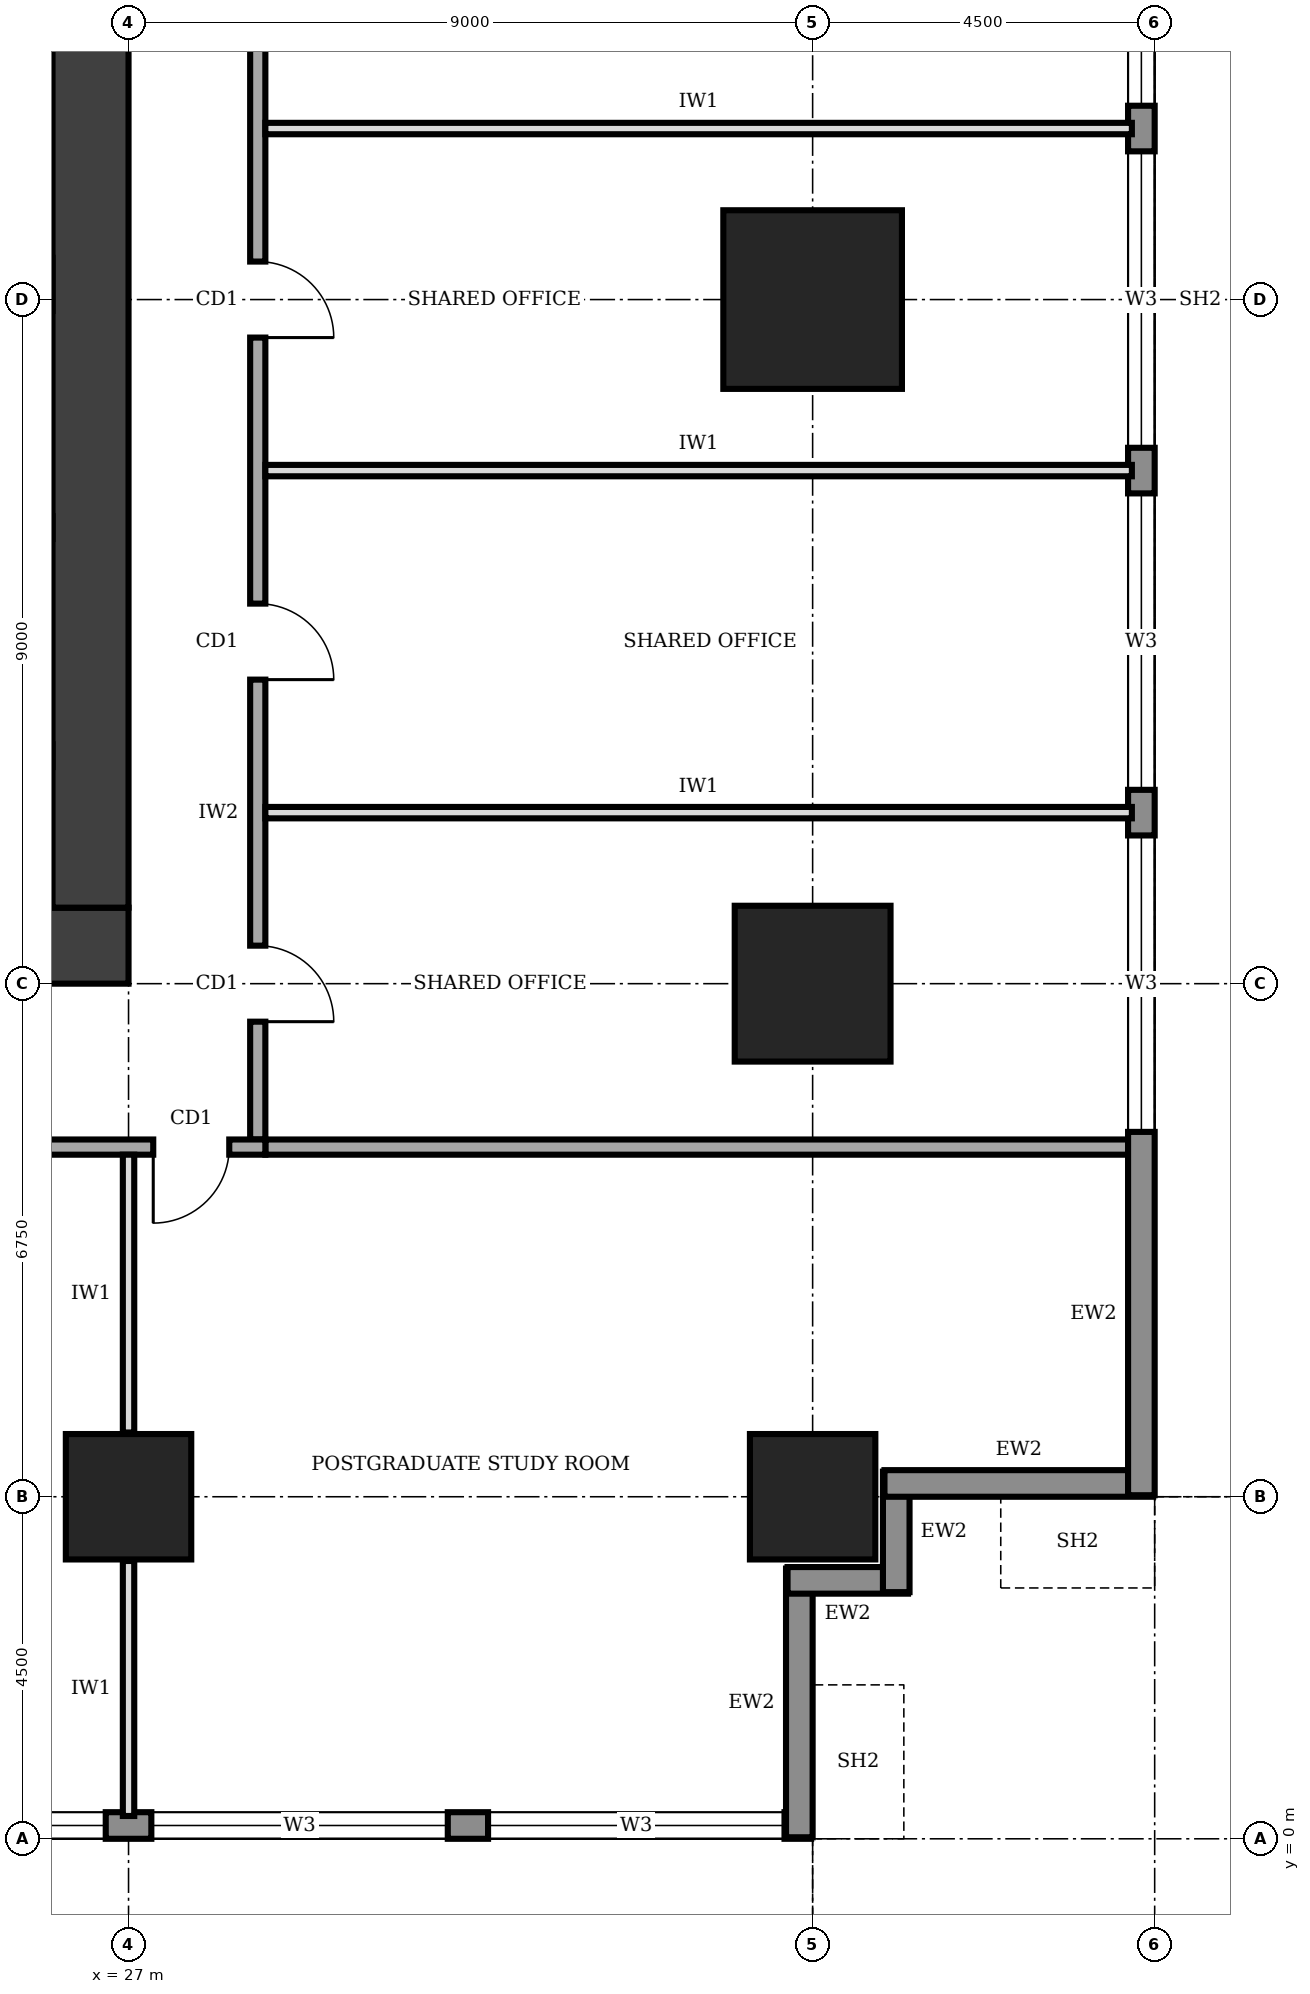
"""IFC4 building model, lengths in metres.
Left out: names, types, materials, properties, quantities, classifications, styles, units other than length and angle.
Written with IfcOpenShell. Run it as: python <this file> out.ifc"""

import sys

from ifc_helpers import new_model, si_unit, direction, frame, frame_2d, origin, origin_2d, place, context, subcontext, project, spatial, rectangle, extrude, element, fill, save


model = new_model("IFC4")
c1 = context("Model", 3, precision=1e-05, world=origin(), true_north=direction((0.0, 1.0)))
c2 = subcontext(c1, "Body", "Model", "MODEL_VIEW")
j1 = project(units=[si_unit("LENGTHUNIT", "METRE"), si_unit("PLANEANGLEUNIT", "RADIAN")], contexts=[c1])
p1 = place(None, origin())
s1 = spatial("IfcSite", under=j1, at=p1, CompositionType="ELEMENT")
p2 = place(p1, origin())
s2 = spatial("IfcBuilding", under=s1, at=p2, CompositionType="ELEMENT")
p3 = place(p2, frame((0.0, 0.0, 181.0)))
s3 = spatial("IfcBuildingStorey", under=s2, at=p3, CompositionType="ELEMENT", Elevation=181.0)
p4 = place(p3, frame((13.5, 11.75, 0.0), z_axis=(0.0, 0.0, 1.0), x_axis=(1.0, 0.0, 0.0)))
e1 = element("IfcWall", 1, at=p4, inside=s3, PredefinedType="SHEAR", context=c2, shape_type="SweptSolid", body=[
    extrude(rectangle(XDim=13.5, YDim=1.0, at=frame_2d((6.75, 0.0))), origin(), (0.0, 0.0, 1.0), 4.0),
])
p5 = place(p4, frame((4.75, 0.0, 0.0)))
e2 = element("IfcOpeningElement", 2, at=p5, cuts=e1, PredefinedType="OPENING", context=c2, shape_type="SweptSolid", body=[
    extrude(rectangle(XDim=1.0, YDim=2.1, at=frame_2d((0.5, 1.05))), frame((0.0, 0.51, 0.0), z_axis=(0.0, -1.0, 0.0), x_axis=(1.0, 0.0, 0.0)), (0.0, 0.0, 1.0), 1.02),
])
p6 = place(p3, frame((26.5, 12.25, 0.0), z_axis=(0.0, 0.0, 1.0), x_axis=(0.0, 1.0, 0.0)))
e3 = element("IfcWall", 3, at=p6, inside=s3, PredefinedType="SHEAR", context=c2, shape_type="SweptSolid", body=[
    extrude(rectangle(XDim=16.0, YDim=1.0, at=frame_2d((8.0, 0.0))), origin(), (0.0, 0.0, 1.0), 4.0),
])
for number, where, z_axis, x_axis in (
    (4, (27.0, 4.5, 0.0), (0.0, 0.0, 1.0), (1.0, 0.0, 0.0)),
    (5, (36.0, 4.5, 0.0), (0.0, 0.0, 1.0), (1.0, 0.0, 0.0)),
):
    element("IfcColumn", number, at=place(p3, frame(where, z_axis=z_axis, x_axis=x_axis)), inside=s3, PredefinedType="COLUMN", context=c2, shape_type="SweptSolid", body=[
        extrude(rectangle(XDim=1.65, YDim=1.65, at=origin_2d()), origin(), (0.0, 0.0, 1.0), 4.0),
    ])
p7 = place(p3, frame((36.0, 11.25, 0.0), z_axis=(0.0, 0.0, 1.0), x_axis=(1.0, 0.0, 0.0)))
e6 = element("IfcColumn", 6, at=p7, inside=s3, PredefinedType="COLUMN", context=c2, shape_type="SweptSolid", body=[
    extrude(rectangle(XDim=2.05, YDim=2.05, at=origin_2d()), origin(), (0.0, 0.0, 1.0), 4.0),
])
p8 = place(p3, frame((36.0, 20.25, 0.0), z_axis=(0.0, 0.0, 1.0), x_axis=(1.0, 0.0, 0.0)))
e7 = element("IfcColumn", 7, at=p8, inside=s3, PredefinedType="COLUMN", context=c2, shape_type="SweptSolid", body=[
    extrude(rectangle(XDim=2.35, YDim=2.35, at=origin_2d()), origin(), (0.0, 0.0, 1.0), 4.0),
])
p9 = place(p3, frame((4.52, 0.175, 0.0), z_axis=(0.0, 0.0, 1.0), x_axis=(1.0, 0.0, 0.0)))
e8 = element("IfcWall", 8, at=p9, inside=s3, PredefinedType="STANDARD", context=c2, shape_type="SweptSolid", body=[
    extrude(rectangle(XDim=31.46, YDim=0.35, at=frame_2d((15.73, 0.0))), origin(), (0.0, 0.0, 1.0), 3.75),
])
p10 = place(p9, frame((4.78, 0.0, 0.95)))
e9 = element("IfcOpeningElement", 9, at=p10, cuts=e8, PredefinedType="OPENING", context=c2, shape_type="SweptSolid", body=[
    extrude(rectangle(XDim=3.9, YDim=1.8, at=frame_2d((1.95, 0.9))), frame((0.0, 0.185, 0.0), z_axis=(0.0, -1.0, 0.0), x_axis=(1.0, 0.0, 0.0)), (0.0, 0.0, 1.0), 0.37),
])
p11 = place(p9, frame((9.28, 0.0, 0.95)))
e10 = element("IfcOpeningElement", 10, at=p11, cuts=e8, PredefinedType="OPENING", context=c2, shape_type="SweptSolid", body=[
    extrude(rectangle(XDim=3.9, YDim=1.8, at=frame_2d((1.95, 0.9))), frame((0.0, 0.185, 0.0), z_axis=(0.0, -1.0, 0.0), x_axis=(1.0, 0.0, 0.0)), (0.0, 0.0, 1.0), 0.37),
])
p12 = place(p9, frame((13.78, 0.0, 0.95)))
e11 = element("IfcOpeningElement", 11, at=p12, cuts=e8, PredefinedType="OPENING", context=c2, shape_type="SweptSolid", body=[
    extrude(rectangle(XDim=3.9, YDim=1.8, at=frame_2d((1.95, 0.9))), frame((0.0, 0.185, 0.0), z_axis=(0.0, -1.0, 0.0), x_axis=(1.0, 0.0, 0.0)), (0.0, 0.0, 1.0), 0.37),
])
p13 = place(p9, frame((18.28, 0.0, 0.95)))
e12 = element("IfcOpeningElement", 12, at=p13, cuts=e8, PredefinedType="OPENING", context=c2, shape_type="SweptSolid", body=[
    extrude(rectangle(XDim=3.9, YDim=1.8, at=frame_2d((1.95, 0.9))), frame((0.0, 0.185, 0.0), z_axis=(0.0, -1.0, 0.0), x_axis=(1.0, 0.0, 0.0)), (0.0, 0.0, 1.0), 0.37),
])
p14 = place(p9, frame((22.78, 0.0, 0.95)))
e13 = element("IfcOpeningElement", 13, at=p14, cuts=e8, PredefinedType="OPENING", context=c2, shape_type="SweptSolid", body=[
    extrude(rectangle(XDim=3.9, YDim=1.8, at=frame_2d((1.95, 0.9))), frame((0.0, 0.185, 0.0), z_axis=(0.0, -1.0, 0.0), x_axis=(1.0, 0.0, 0.0)), (0.0, 0.0, 1.0), 0.37),
])
p15 = place(p9, frame((27.21, 0.0, 0.95)))
e14 = element("IfcOpeningElement", 14, at=p15, cuts=e8, PredefinedType="OPENING", context=c2, shape_type="SweptSolid", body=[
    extrude(rectangle(XDim=3.9, YDim=1.8, at=frame_2d((1.95, 0.9))), frame((0.0, 0.185, 0.0), z_axis=(0.0, -1.0, 0.0), x_axis=(1.0, 0.0, 0.0)), (0.0, 0.0, 1.0), 0.37),
])
p16 = place(p3, frame((35.825, 0.02, 0.0), z_axis=(0.0, 0.0, 1.0), x_axis=(0.0, 1.0, 0.0)))
e15 = element("IfcWall", 15, at=p16, inside=s3, PredefinedType="STANDARD", context=c2, shape_type="SweptSolid", body=[
    extrude(rectangle(XDim=3.535, YDim=0.35, at=frame_2d((1.768, 0.0))), origin(), (0.0, 0.0, 1.0), 2.85),
])
for number, where, z_axis, x_axis in (
    (16, (35.67, 3.4, 0.0), (0.0, 0.0, 1.0), (1.0, 0.0, 0.0)),
    (17, (37.1, 3.245, 0.0), (0.0, 0.0, 1.0), (0.0, 1.0, 0.0)),
):
    element("IfcWall", number, at=place(p3, frame(where, z_axis=z_axis, x_axis=x_axis)), inside=s3, PredefinedType="STANDARD", context=c2, shape_type="SweptSolid", body=[
        extrude(rectangle(XDim=1.585, YDim=0.35, at=frame_2d((0.792, 0.0))), origin(), (0.0, 0.0, 1.0), 3.75),
    ])
p17 = place(p3, frame((36.945, 4.675, 0.0), z_axis=(0.0, 0.0, 1.0), x_axis=(1.0, 0.0, 0.0)))
e18 = element("IfcWall", 18, at=p17, inside=s3, PredefinedType="STANDARD", context=c2, shape_type="SweptSolid", body=[
    extrude(rectangle(XDim=3.535, YDim=0.35, at=frame_2d((1.768, 0.0))), origin(), (0.0, 0.0, 1.0), 2.85),
])
p18 = place(p3, frame((40.325, 4.52, 0.0), z_axis=(0.0, 0.0, 1.0), x_axis=(0.0, 1.0, 0.0)))
e19 = element("IfcWall", 19, at=p18, inside=s3, PredefinedType="STANDARD", context=c2, shape_type="SweptSolid", body=[
    extrude(rectangle(XDim=31.46, YDim=0.35, at=frame_2d((15.73, 0.0))), origin(), (0.0, 0.0, 1.0), 3.75),
])
p19 = place(p18, frame((4.78, 0.0, 0.95)))
e20 = element("IfcOpeningElement", 20, at=p19, cuts=e19, PredefinedType="OPENING", context=c2, shape_type="SweptSolid", body=[
    extrude(rectangle(XDim=3.9, YDim=1.8, at=frame_2d((1.95, 0.9))), frame((0.0, 0.185, 0.0), z_axis=(0.0, -1.0, 0.0), x_axis=(1.0, 0.0, 0.0)), (0.0, 0.0, 1.0), 0.37),
])
p20 = place(p18, frame((9.28, 0.0, 0.95)))
e21 = element("IfcOpeningElement", 21, at=p20, cuts=e19, PredefinedType="OPENING", context=c2, shape_type="SweptSolid", body=[
    extrude(rectangle(XDim=3.9, YDim=1.8, at=frame_2d((1.95, 0.9))), frame((0.0, 0.185, 0.0), z_axis=(0.0, -1.0, 0.0), x_axis=(1.0, 0.0, 0.0)), (0.0, 0.0, 1.0), 0.37),
])
p21 = place(p18, frame((13.78, 0.0, 0.95)))
e22 = element("IfcOpeningElement", 22, at=p21, cuts=e19, PredefinedType="OPENING", context=c2, shape_type="SweptSolid", body=[
    extrude(rectangle(XDim=3.9, YDim=1.8, at=frame_2d((1.95, 0.9))), frame((0.0, 0.185, 0.0), z_axis=(0.0, -1.0, 0.0), x_axis=(1.0, 0.0, 0.0)), (0.0, 0.0, 1.0), 0.37),
])
p22 = place(p18, frame((18.28, 0.0, 0.95)))
e23 = element("IfcOpeningElement", 23, at=p22, cuts=e19, PredefinedType="OPENING", context=c2, shape_type="SweptSolid", body=[
    extrude(rectangle(XDim=3.9, YDim=1.8, at=frame_2d((1.95, 0.9))), frame((0.0, 0.185, 0.0), z_axis=(0.0, -1.0, 0.0), x_axis=(1.0, 0.0, 0.0)), (0.0, 0.0, 1.0), 0.37),
])
p23 = place(p18, frame((22.78, 0.0, 0.95)))
e24 = element("IfcOpeningElement", 24, at=p23, cuts=e19, PredefinedType="OPENING", context=c2, shape_type="SweptSolid", body=[
    extrude(rectangle(XDim=3.9, YDim=1.8, at=frame_2d((1.95, 0.9))), frame((0.0, 0.185, 0.0), z_axis=(0.0, -1.0, 0.0), x_axis=(1.0, 0.0, 0.0)), (0.0, 0.0, 1.0), 0.37),
])
p24 = place(p18, frame((27.21, 0.0, 0.95)))
e25 = element("IfcOpeningElement", 25, at=p24, cuts=e19, PredefinedType="OPENING", context=c2, shape_type="SweptSolid", body=[
    extrude(rectangle(XDim=3.9, YDim=1.8, at=frame_2d((1.95, 0.9))), frame((0.0, 0.185, 0.0), z_axis=(0.0, -1.0, 0.0), x_axis=(1.0, 0.0, 0.0)), (0.0, 0.0, 1.0), 0.37),
])
p25 = place(p3, frame((11.9, 9.1, 0.0), z_axis=(0.0, 0.0, 1.0), x_axis=(1.0, 0.0, 0.0)))
e26 = element("IfcWall", 26, at=p25, inside=s3, PredefinedType="SOLIDWALL", context=c2, shape_type="SweptSolid", body=[
    extrude(rectangle(XDim=16.9, YDim=0.2, at=frame_2d((8.45, 0.0))), origin(), (0.0, 0.0, 1.0), 3.75),
])
p26 = place(p25, frame((15.425, 0.0, 0.0)))
e27 = element("IfcOpeningElement", 27, at=p26, cuts=e26, PredefinedType="OPENING", context=c2, shape_type="SweptSolid", body=[
    extrude(rectangle(XDim=1.0, YDim=2.1, at=frame_2d((0.5, 1.05))), frame((0.0, 0.11, 0.0), z_axis=(0.0, -1.0, 0.0), x_axis=(1.0, 0.0, 0.0)), (0.0, 0.0, 1.0), 0.22),
])
p27 = place(p3, frame((28.7, 9.2, 0.0), z_axis=(0.0, 0.0, 1.0), x_axis=(0.0, 1.0, 0.0)))
e28 = element("IfcWall", 28, at=p27, inside=s3, PredefinedType="SOLIDWALL", context=c2, shape_type="SweptSolid", body=[
    extrude(rectangle(XDim=22.3, YDim=0.2, at=frame_2d((11.15, 0.0))), origin(), (0.0, 0.0, 1.0), 3.75),
])
p28 = place(p27, frame((1.55, 0.0, 0.0)))
e29 = element("IfcOpeningElement", 29, at=p28, cuts=e28, PredefinedType="OPENING", context=c2, shape_type="SweptSolid", body=[
    extrude(rectangle(XDim=1.0, YDim=2.1, at=frame_2d((0.5, 1.05))), frame((0.0, 0.11, 0.0), z_axis=(0.0, -1.0, 0.0), x_axis=(1.0, 0.0, 0.0)), (0.0, 0.0, 1.0), 0.22),
])
p29 = place(p27, frame((6.05, 0.0, 0.0)))
e30 = element("IfcOpeningElement", 30, at=p29, cuts=e28, PredefinedType="OPENING", context=c2, shape_type="SweptSolid", body=[
    extrude(rectangle(XDim=1.0, YDim=2.1, at=frame_2d((0.5, 1.05))), frame((0.0, 0.11, 0.0), z_axis=(0.0, -1.0, 0.0), x_axis=(1.0, 0.0, 0.0)), (0.0, 0.0, 1.0), 0.22),
])
p30 = place(p27, frame((10.55, 0.0, 0.0)))
e31 = element("IfcOpeningElement", 31, at=p30, cuts=e28, PredefinedType="OPENING", context=c2, shape_type="SweptSolid", body=[
    extrude(rectangle(XDim=1.0, YDim=2.1, at=frame_2d((0.5, 1.05))), frame((0.0, 0.11, 0.0), z_axis=(0.0, -1.0, 0.0), x_axis=(1.0, 0.0, 0.0)), (0.0, 0.0, 1.0), 0.22),
])
p31 = place(p27, frame((15.05, 0.0, 0.0)))
e32 = element("IfcOpeningElement", 32, at=p31, cuts=e28, PredefinedType="OPENING", context=c2, shape_type="SweptSolid", body=[
    extrude(rectangle(XDim=1.0, YDim=2.1, at=frame_2d((0.5, 1.05))), frame((0.0, 0.11, 0.0), z_axis=(0.0, -1.0, 0.0), x_axis=(1.0, 0.0, 0.0)), (0.0, 0.0, 1.0), 0.22),
])
p32 = place(p27, frame((19.55, 0.0, 0.0)))
e33 = element("IfcOpeningElement", 33, at=p32, cuts=e28, PredefinedType="OPENING", context=c2, shape_type="SweptSolid", body=[
    extrude(rectangle(XDim=1.0, YDim=2.1, at=frame_2d((0.5, 1.05))), frame((0.0, 0.11, 0.0), z_axis=(0.0, -1.0, 0.0), x_axis=(1.0, 0.0, 0.0)), (0.0, 0.0, 1.0), 0.22),
])
p33 = place(p3, frame((28.8, 9.1, 0.0), z_axis=(0.0, 0.0, 1.0), x_axis=(1.0, 0.0, 0.0)))
e34 = element("IfcWall", 34, at=p33, inside=s3, PredefinedType="SOLIDWALL", context=c2, shape_type="SweptSolid", body=[
    extrude(rectangle(XDim=11.4, YDim=0.2, at=frame_2d((5.7, 0.0))), origin(), (0.0, 0.0, 1.0), 3.75),
])
p34 = place(p3, frame((27.0, 0.3, 0.0), z_axis=(0.0, 0.0, 1.0), x_axis=(0.0, 1.0, 0.0)))
e35 = element("IfcWall", 35, at=p34, inside=s3, PredefinedType="PARTITIONING", context=c2, shape_type="SweptSolid", body=[
    extrude(rectangle(XDim=3.355, YDim=0.15, at=frame_2d((1.677, 0.0))), origin(), (0.0, 0.0, 1.0), 2.85),
])
p35 = place(p3, frame((27.0, 5.345, 0.0), z_axis=(0.0, 0.0, 1.0), x_axis=(0.0, 1.0, 0.0)))
e36 = element("IfcWall", 36, at=p35, inside=s3, PredefinedType="PARTITIONING", context=c2, shape_type="SweptSolid", body=[
    extrude(rectangle(XDim=3.655, YDim=0.15, at=frame_2d((1.828, 0.0))), origin(), (0.0, 0.0, 1.0), 2.85),
])
for number, where, z_axis, x_axis in (
    (37, (28.8, 13.5, 0.0), (0.0, 0.0, 1.0), (1.0, 0.0, 0.0)),
    (38, (28.8, 18.0, 0.0), (0.0, 0.0, 1.0), (1.0, 0.0, 0.0)),
    (39, (28.8, 22.5, 0.0), (0.0, 0.0, 1.0), (1.0, 0.0, 0.0)),
):
    element("IfcWall", number, at=place(p3, frame(where, z_axis=z_axis, x_axis=x_axis)), inside=s3, PredefinedType="PARTITIONING", context=c2, shape_type="SweptSolid", body=[
        extrude(rectangle(XDim=11.4, YDim=0.15, at=frame_2d((5.7, 0.0))), origin(), (0.0, 0.0, 1.0), 3.75),
    ])
p36 = place(p13, origin())
e40 = element("IfcWindow", 40, at=p36, inside=s3, PartitioningType="SINGLE_PANEL", PredefinedType="WINDOW", context=c2, shape_type="SweptSolid", body=[
    extrude(rectangle(XDim=3.9, YDim=1.8, at=frame_2d((1.95, 0.9))), frame((0.0, 0.03, 0.0), z_axis=(0.0, -1.0, 0.0), x_axis=(1.0, 0.0, 0.0)), (0.0, 0.0, 1.0), 0.06),
])
fill(e12, e40)
p37 = place(p14, origin())
e41 = element("IfcWindow", 41, at=p37, inside=s3, PartitioningType="SINGLE_PANEL", PredefinedType="WINDOW", context=c2, shape_type="SweptSolid", body=[
    extrude(rectangle(XDim=3.9, YDim=1.8, at=frame_2d((1.95, 0.9))), frame((0.0, 0.03, 0.0), z_axis=(0.0, -1.0, 0.0), x_axis=(1.0, 0.0, 0.0)), (0.0, 0.0, 1.0), 0.06),
])
fill(e13, e41)
p38 = place(p15, origin())
e42 = element("IfcWindow", 42, at=p38, inside=s3, PartitioningType="SINGLE_PANEL", PredefinedType="WINDOW", context=c2, shape_type="SweptSolid", body=[
    extrude(rectangle(XDim=3.9, YDim=1.8, at=frame_2d((1.95, 0.9))), frame((0.0, 0.03, 0.0), z_axis=(0.0, -1.0, 0.0), x_axis=(1.0, 0.0, 0.0)), (0.0, 0.0, 1.0), 0.06),
])
fill(e14, e42)
p39 = place(p19, origin())
e43 = element("IfcWindow", 43, at=p39, inside=s3, PartitioningType="SINGLE_PANEL", PredefinedType="WINDOW", context=c2, shape_type="SweptSolid", body=[
    extrude(rectangle(XDim=3.9, YDim=1.8, at=frame_2d((1.95, 0.9))), frame((0.0, 0.03, 0.0), z_axis=(0.0, -1.0, 0.0), x_axis=(1.0, 0.0, 0.0)), (0.0, 0.0, 1.0), 0.06),
])
fill(e20, e43)
p40 = place(p20, origin())
e44 = element("IfcWindow", 44, at=p40, inside=s3, PartitioningType="SINGLE_PANEL", PredefinedType="WINDOW", context=c2, shape_type="SweptSolid", body=[
    extrude(rectangle(XDim=3.9, YDim=1.8, at=frame_2d((1.95, 0.9))), frame((0.0, 0.03, 0.0), z_axis=(0.0, -1.0, 0.0), x_axis=(1.0, 0.0, 0.0)), (0.0, 0.0, 1.0), 0.06),
])
fill(e21, e44)
p41 = place(p21, origin())
e45 = element("IfcWindow", 45, at=p41, inside=s3, PartitioningType="SINGLE_PANEL", PredefinedType="WINDOW", context=c2, shape_type="SweptSolid", body=[
    extrude(rectangle(XDim=3.9, YDim=1.8, at=frame_2d((1.95, 0.9))), frame((0.0, 0.03, 0.0), z_axis=(0.0, -1.0, 0.0), x_axis=(1.0, 0.0, 0.0)), (0.0, 0.0, 1.0), 0.06),
])
fill(e22, e45)
p42 = place(p22, origin())
e46 = element("IfcWindow", 46, at=p42, inside=s3, PartitioningType="SINGLE_PANEL", PredefinedType="WINDOW", context=c2, shape_type="SweptSolid", body=[
    extrude(rectangle(XDim=3.9, YDim=1.8, at=frame_2d((1.95, 0.9))), frame((0.0, 0.03, 0.0), z_axis=(0.0, -1.0, 0.0), x_axis=(1.0, 0.0, 0.0)), (0.0, 0.0, 1.0), 0.06),
])
fill(e23, e46)
p43 = place(p26, frame((1.0, 0.0, 0.0), z_axis=(0.0, 0.0, 1.0), x_axis=(-1.0, 0.0, 0.0)))
e47 = element("IfcDoor", 47, at=p43, inside=s3, OperationType="SINGLE_SWING_RIGHT", PredefinedType="DOOR", context=c2, shape_type="SweptSolid", body=[
    extrude(rectangle(XDim=1.0, YDim=2.1, at=frame_2d((0.5, 1.05))), frame((0.0, 0.025, 0.0), z_axis=(0.0, -1.0, 0.0), x_axis=(1.0, 0.0, 0.0)), (0.0, 0.0, 1.0), 0.05),
])
fill(e27, e47)
p44 = place(p28, frame((1.0, 0.0, 0.0), z_axis=(0.0, 0.0, 1.0), x_axis=(-1.0, 0.0, 0.0)))
e48 = element("IfcDoor", 48, at=p44, inside=s3, OperationType="SINGLE_SWING_RIGHT", PredefinedType="DOOR", context=c2, shape_type="SweptSolid", body=[
    extrude(rectangle(XDim=1.0, YDim=2.1, at=frame_2d((0.5, 1.05))), frame((0.0, 0.025, 0.0), z_axis=(0.0, -1.0, 0.0), x_axis=(1.0, 0.0, 0.0)), (0.0, 0.0, 1.0), 0.05),
])
fill(e29, e48)
p45 = place(p29, frame((1.0, 0.0, 0.0), z_axis=(0.0, 0.0, 1.0), x_axis=(-1.0, 0.0, 0.0)))
e49 = element("IfcDoor", 49, at=p45, inside=s3, OperationType="SINGLE_SWING_RIGHT", PredefinedType="DOOR", context=c2, shape_type="SweptSolid", body=[
    extrude(rectangle(XDim=1.0, YDim=2.1, at=frame_2d((0.5, 1.05))), frame((0.0, 0.025, 0.0), z_axis=(0.0, -1.0, 0.0), x_axis=(1.0, 0.0, 0.0)), (0.0, 0.0, 1.0), 0.05),
])
fill(e30, e49)
p46 = place(p30, frame((1.0, 0.0, 0.0), z_axis=(0.0, 0.0, 1.0), x_axis=(-1.0, 0.0, 0.0)))
e50 = element("IfcDoor", 50, at=p46, inside=s3, OperationType="SINGLE_SWING_RIGHT", PredefinedType="DOOR", context=c2, shape_type="SweptSolid", body=[
    extrude(rectangle(XDim=1.0, YDim=2.1, at=frame_2d((0.5, 1.05))), frame((0.0, 0.025, 0.0), z_axis=(0.0, -1.0, 0.0), x_axis=(1.0, 0.0, 0.0)), (0.0, 0.0, 1.0), 0.05),
])
fill(e31, e50)
save(model, sys.argv[1])
